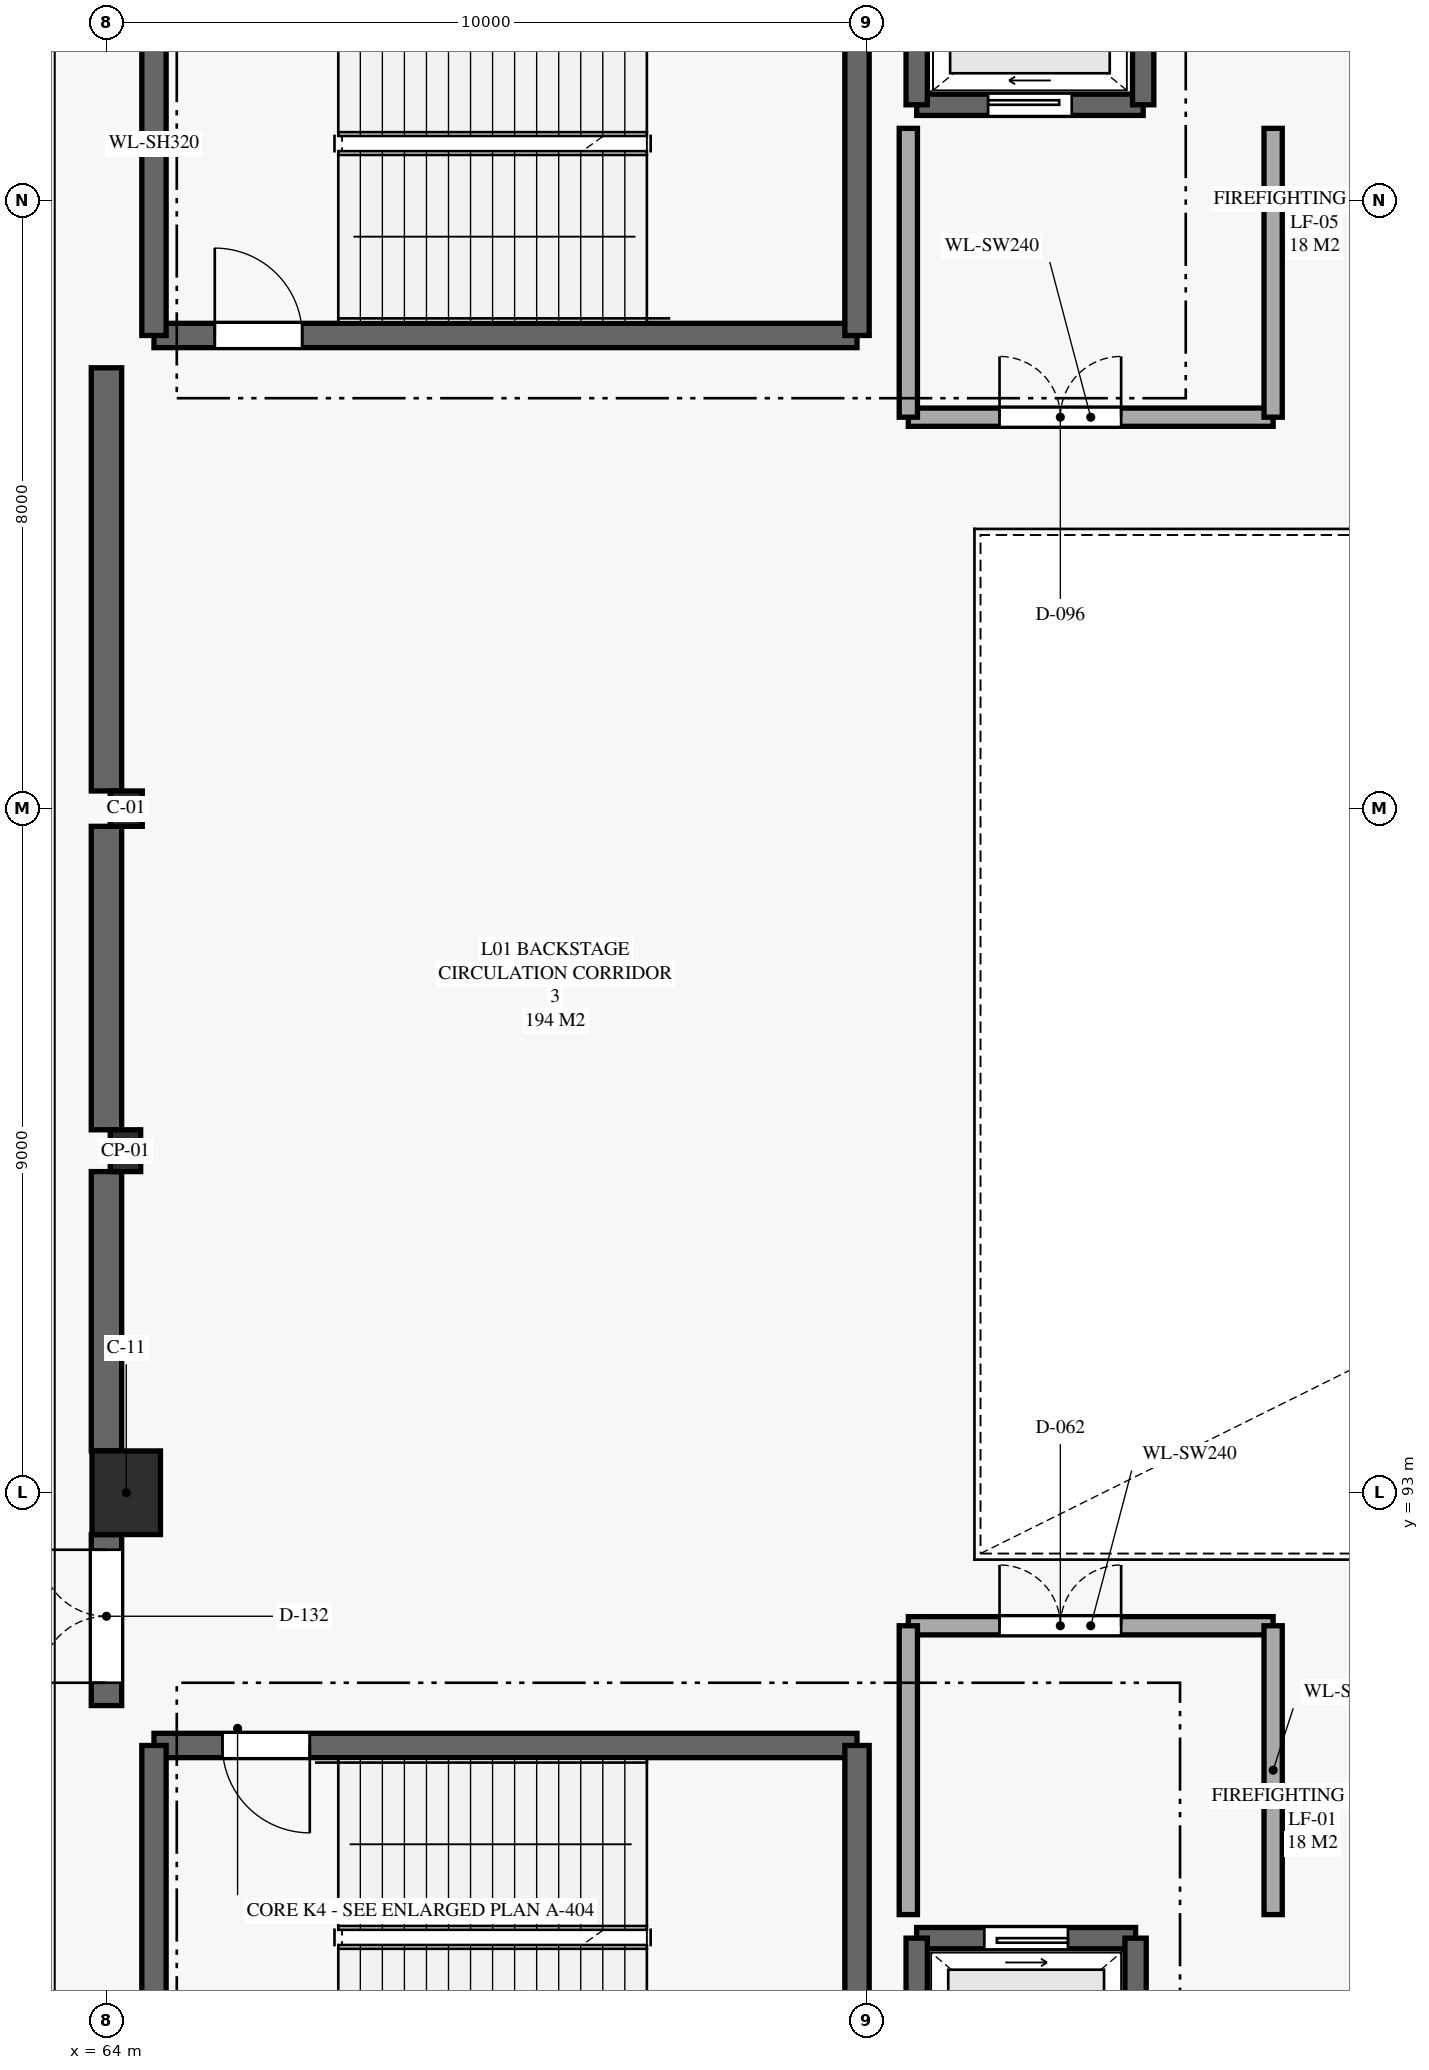
"""IFC4 building model, lengths in metres.
Left out: names, types, materials, properties, quantities, classifications, styles, units other than length and angle.
Written with IfcOpenShell. Run it as: python <this file> out.ifc"""

import sys

from ifc_helpers import new_model, si_unit, direction, frame, frame_2d, origin, origin_2d, place, context, subcontext, project, spatial, rectangle, i_section, extrude, element, fill, save


model = new_model("IFC4")
c1 = context("Model", 3, precision=1e-05, world=origin(), true_north=direction((0.0, 1.0)))
c2 = subcontext(c1, "Body", "Model", "MODEL_VIEW")
j1 = project(units=[si_unit("LENGTHUNIT", "METRE"), si_unit("PLANEANGLEUNIT", "RADIAN")], contexts=[c1])
p1 = place(None, origin())
s1 = spatial("IfcSite", under=j1, at=p1, CompositionType="ELEMENT")
p2 = place(p1, origin())
s2 = spatial("IfcBuilding", under=s1, at=p2, CompositionType="ELEMENT")
p3 = place(p2, frame((0.0, 0.0, 5.0)))
s3 = spatial("IfcBuildingStorey", under=s2, at=p3, CompositionType="ELEMENT", Elevation=5.0)
p4 = place(p3, frame((64.25, 97.5, 0.0), z_axis=(0.0, 0.0, 1.0), x_axis=(1.0, 0.0, 0.0)))
e1 = element("IfcColumn", 1, at=p4, inside=s3, PredefinedType="PILASTER", context=c2, shape_type="SweptSolid", body=[
    extrude(rectangle(XDim=0.4, YDim=0.55, at=origin_2d()), origin(), (0.0, 0.0, 1.0), 4.675),
])
p5 = place(p3, frame((64.26, 93.0, 0.0), z_axis=(0.0, 0.0, 1.0), x_axis=(1.0, 0.0, 0.0)))
e2 = element("IfcColumn", 2, at=p5, inside=s3, PredefinedType="COLUMN", context=c2, shape_type="SweptSolid", body=[
    extrude(rectangle(XDim=0.9, YDim=1.1, at=origin_2d()), origin(), (0.0, 0.0, 1.0), 5.0),
])
p6 = place(p3, frame((64.26, 102.0, 0.0), z_axis=(0.0, 0.0, 1.0), x_axis=(1.0, 0.0, 0.0)))
e3 = element("IfcColumn", 3, at=p6, inside=s3, PredefinedType="COLUMN", context=c2, shape_type="SweptSolid", body=[
    extrude(i_section(OverallWidth=0.422, OverallDepth=0.465, WebThickness=0.045, FlangeThickness=0.073, FilletRadius=0.02, at=origin_2d()), origin(), (0.0, 0.0, 1.0), 5.0),
])
p7 = place(p3, frame((64.625, 108.225, 0.0), z_axis=(0.0, 0.0, 1.0), x_axis=(1.0, 0.0, 0.0)))
e4 = element("IfcWall", 4, at=p7, inside=s3, PredefinedType="SHEAR", context=c2, shape_type="SweptSolid", body=[
    extrude(rectangle(XDim=9.25, YDim=0.32, at=frame_2d((4.625, 0.0))), origin(), (0.0, 0.0, 1.0), 4.675),
])
p8 = place(p7, frame((0.8, 0.0, 0.0)))
e5 = element("IfcOpeningElement", 5, at=p8, cuts=e4, PredefinedType="OPENING", context=c2, shape_type="SweptSolid", body=[
    extrude(rectangle(XDim=1.15, YDim=2.2, at=frame_2d((0.575, 1.1))), frame((0.0, 0.17, 0.0), z_axis=(0.0, -1.0, 0.0), x_axis=(1.0, 0.0, 0.0)), (0.0, 0.0, 1.0), 0.34),
])
for number, where, z_axis, x_axis in (
    (6, (64.625, 113.275, 0.0), (0.0, 0.0, 1.0), (0.0, -1.0, 0.0)),
    (7, (73.875, 108.225, 0.0), (0.0, 0.0, 1.0), (0.0, 1.0, 0.0)),
):
    element("IfcWall", number, at=place(p3, frame(where, z_axis=z_axis, x_axis=x_axis)), inside=s3, PredefinedType="SHEAR", context=c2, shape_type="SweptSolid", body=[
        extrude(rectangle(XDim=5.05, YDim=0.32, at=frame_2d((2.525, 0.0))), origin(), (0.0, 0.0, 1.0), 4.675),
    ])
p9 = place(p3, frame((73.875, 89.675, 0.0), z_axis=(0.0, 0.0, 1.0), x_axis=(-1.0, 0.0, 0.0)))
e8 = element("IfcWall", 8, at=p9, inside=s3, PredefinedType="SHEAR", context=c2, shape_type="SweptSolid", body=[
    extrude(rectangle(XDim=9.25, YDim=0.32, at=frame_2d((4.625, 0.0))), origin(), (0.0, 0.0, 1.0), 4.675),
])
p10 = place(p9, frame((7.2, 0.0, 0.0)))
e9 = element("IfcOpeningElement", 9, at=p10, cuts=e8, PredefinedType="OPENING", context=c2, shape_type="SweptSolid", body=[
    extrude(rectangle(XDim=1.15, YDim=2.2, at=frame_2d((0.575, 1.1))), frame((0.0, 0.17, 0.0), z_axis=(0.0, -1.0, 0.0), x_axis=(1.0, 0.0, 0.0)), (0.0, 0.0, 1.0), 0.34),
])
for number, where, z_axis, x_axis in (
    (10, (64.625, 89.675, 0.0), (0.0, 0.0, 1.0), (0.0, -1.0, 0.0)),
    (11, (73.875, 84.625, 0.0), (0.0, 0.0, 1.0), (0.0, 1.0, 0.0)),
):
    element("IfcWall", number, at=place(p3, frame(where, z_axis=z_axis, x_axis=x_axis)), inside=s3, PredefinedType="SHEAR", context=c2, shape_type="SweptSolid", body=[
        extrude(rectangle(XDim=5.05, YDim=0.32, at=frame_2d((2.525, 0.0))), origin(), (0.0, 0.0, 1.0), 4.675),
    ])
p11 = place(p3, frame((77.54, 87.14, 0.0), z_axis=(0.0, 0.0, 1.0), x_axis=(-1.0, 0.0, 0.0)))
e12 = element("IfcWall", 12, at=p11, inside=s3, PredefinedType="SHEAR", context=c2, shape_type="SweptSolid", body=[
    extrude(rectangle(XDim=2.88, YDim=0.28, at=frame_2d((1.44, 0.0))), origin(), (0.0, 0.0, 1.0), 4.675),
])
p12 = place(p11, frame((0.89, 0.0, 0.0)))
e13 = element("IfcOpeningElement", 13, at=p12, cuts=e12, PredefinedType="OPENING", context=c2, shape_type="SweptSolid", body=[
    extrude(rectangle(XDim=1.1, YDim=2.2, at=frame_2d((0.55, 1.1))), frame((0.0, 0.15, 0.0), z_axis=(0.0, -1.0, 0.0), x_axis=(1.0, 0.0, 0.0)), (0.0, 0.0, 1.0), 0.3),
])
for number, where, z_axis, x_axis in (
    (14, (74.66, 87.14, 0.0), (0.0, 0.0, 1.0), (0.0, -1.0, 0.0)),
    (15, (77.54, 84.66, 0.0), (0.0, 0.0, 1.0), (0.0, 1.0, 0.0)),
):
    element("IfcWall", number, at=place(p3, frame(where, z_axis=z_axis, x_axis=x_axis)), inside=s3, PredefinedType="SHEAR", context=c2, shape_type="SweptSolid", body=[
        extrude(rectangle(XDim=2.48, YDim=0.28, at=frame_2d((1.24, 0.0))), origin(), (0.0, 0.0, 1.0), 4.675),
    ])
p13 = place(p3, frame((74.55, 91.25, 0.0), z_axis=(0.0, 0.0, 1.0), x_axis=(1.0, 0.0, 0.0)))
e16 = element("IfcWall", 16, at=p13, inside=s3, PredefinedType="SOLIDWALL", context=c2, shape_type="SweptSolid", body=[
    extrude(rectangle(XDim=4.8, YDim=0.24, at=frame_2d((2.4, 0.0))), origin(), (0.0, 0.0, 1.0), 4.675),
])
p14 = place(p13, frame((1.2, 0.0, 0.0)))
e17 = element("IfcOpeningElement", 17, at=p14, cuts=e16, PredefinedType="OPENING", context=c2, shape_type="SweptSolid", body=[
    extrude(rectangle(XDim=1.6, YDim=2.2, at=frame_2d((0.8, 1.1))), frame((0.0, 0.13, 0.0), z_axis=(0.0, -1.0, 0.0), x_axis=(1.0, 0.0, 0.0)), (0.0, 0.0, 1.0), 0.26),
])
for number, where, z_axis, x_axis in (
    (18, (74.55, 91.25, 0.0), (0.0, 0.0, 1.0), (0.0, -1.0, 0.0)),
    (19, (79.35, 87.45, 0.0), (0.0, 0.0, 1.0), (0.0, 1.0, 0.0)),
):
    element("IfcWall", number, at=place(p3, frame(where, z_axis=z_axis, x_axis=x_axis)), inside=s3, PredefinedType="SOLIDWALL", context=c2, shape_type="SweptSolid", body=[
        extrude(rectangle(XDim=3.8, YDim=0.24, at=frame_2d((1.9, 0.0))), origin(), (0.0, 0.0, 1.0), 4.675),
    ])
p15 = place(p3, frame((74.66, 111.26, 0.0), z_axis=(0.0, 0.0, 1.0), x_axis=(1.0, 0.0, 0.0)))
e20 = element("IfcWall", 20, at=p15, inside=s3, PredefinedType="SHEAR", context=c2, shape_type="SweptSolid", body=[
    extrude(rectangle(XDim=2.98, YDim=0.28, at=frame_2d((1.49, 0.0))), origin(), (0.0, 0.0, 1.0), 4.675),
])
p16 = place(p15, frame((0.94, 0.0, 0.0)))
e21 = element("IfcOpeningElement", 21, at=p16, cuts=e20, PredefinedType="OPENING", context=c2, shape_type="SweptSolid", body=[
    extrude(rectangle(XDim=1.1, YDim=2.2, at=frame_2d((0.55, 1.1))), frame((0.0, 0.15, 0.0), z_axis=(0.0, -1.0, 0.0), x_axis=(1.0, 0.0, 0.0)), (0.0, 0.0, 1.0), 0.3),
])
for number, where, z_axis, x_axis in (
    (22, (74.66, 113.74, 0.0), (0.0, 0.0, 1.0), (0.0, -1.0, 0.0)),
    (23, (77.64, 111.26, 0.0), (0.0, 0.0, 1.0), (0.0, 1.0, 0.0)),
):
    element("IfcWall", number, at=place(p3, frame(where, z_axis=z_axis, x_axis=x_axis)), inside=s3, PredefinedType="SHEAR", context=c2, shape_type="SweptSolid", body=[
        extrude(rectangle(XDim=2.48, YDim=0.28, at=frame_2d((1.24, 0.0))), origin(), (0.0, 0.0, 1.0), 4.675),
    ])
p17 = place(p3, frame((74.55, 107.15, 0.0), z_axis=(0.0, 0.0, 1.0), x_axis=(1.0, 0.0, 0.0)))
e24 = element("IfcWall", 24, at=p17, inside=s3, PredefinedType="SOLIDWALL", context=c2, shape_type="SweptSolid", body=[
    extrude(rectangle(XDim=4.8, YDim=0.24, at=frame_2d((2.4, 0.0))), origin(), (0.0, 0.0, 1.0), 4.675),
])
p18 = place(p17, frame((1.2, 0.0, 0.0)))
e25 = element("IfcOpeningElement", 25, at=p18, cuts=e24, PredefinedType="OPENING", context=c2, shape_type="SweptSolid", body=[
    extrude(rectangle(XDim=1.6, YDim=2.2, at=frame_2d((0.8, 1.1))), frame((0.0, 0.13, 0.0), z_axis=(0.0, -1.0, 0.0), x_axis=(1.0, 0.0, 0.0)), (0.0, 0.0, 1.0), 0.26),
])
for number, where, z_axis, x_axis in (
    (26, (74.55, 110.95, 0.0), (0.0, 0.0, 1.0), (0.0, -1.0, 0.0)),
    (27, (79.35, 107.15, 0.0), (0.0, 0.0, 1.0), (0.0, 1.0, 0.0)),
):
    element("IfcWall", number, at=place(p3, frame(where, z_axis=z_axis, x_axis=x_axis)), inside=s3, PredefinedType="SOLIDWALL", context=c2, shape_type="SweptSolid", body=[
        extrude(rectangle(XDim=3.8, YDim=0.24, at=frame_2d((1.9, 0.0))), origin(), (0.0, 0.0, 1.0), 4.675),
    ])
p19 = place(p3, frame((64.0, 90.2, 0.0), z_axis=(0.0, 0.0, 1.0), x_axis=(0.0, 1.0, 0.0)))
e28 = element("IfcWall", 28, at=p19, inside=s3, PredefinedType="SHEAR", context=c2, shape_type="SweptSolid", body=[
    extrude(rectangle(XDim=2.25, YDim=0.4, at=frame_2d((1.125, 0.0))), origin(), (0.0, 0.0, 1.0), 4.675),
])
p20 = place(p19, frame((0.3, 0.0, 0.0)))
e29 = element("IfcOpeningElement", 29, at=p20, cuts=e28, PredefinedType="OPENING", context=c2, shape_type="SweptSolid", body=[
    extrude(rectangle(XDim=1.75, YDim=2.2, at=frame_2d((0.875, 1.1))), frame((0.0, 0.21, 0.0), z_axis=(0.0, -1.0, 0.0), x_axis=(1.0, 0.0, 0.0)), (0.0, 0.0, 1.0), 0.42),
])
p21 = place(p3, frame((64.0, 93.55, 0.0), z_axis=(0.0, 0.0, 1.0), x_axis=(0.0, 1.0, 0.0)))
e30 = element("IfcWall", 30, at=p21, inside=s3, PredefinedType="SHEAR", context=c2, shape_type="SweptSolid", body=[
    extrude(rectangle(XDim=3.675, YDim=0.4, at=frame_2d((1.837, 0.0))), origin(), (0.0, 0.0, 1.0), 4.675),
])
p22 = place(p3, frame((64.0, 97.775, 0.0), z_axis=(0.0, 0.0, 1.0), x_axis=(0.0, 1.0, 0.0)))
e31 = element("IfcWall", 31, at=p22, inside=s3, PredefinedType="SHEAR", context=c2, shape_type="SweptSolid", body=[
    extrude(rectangle(XDim=3.993, YDim=0.4, at=frame_2d((1.996, 0.0))), origin(), (0.0, 0.0, 1.0), 4.675),
])
p23 = place(p3, frame((64.0, 102.232, 0.0), z_axis=(0.0, 0.0, 1.0), x_axis=(0.0, 1.0, 0.0)))
e32 = element("IfcWall", 32, at=p23, inside=s3, PredefinedType="SHEAR", context=c2, shape_type="SweptSolid", body=[
    extrude(rectangle(XDim=5.568, YDim=0.4, at=frame_2d((2.784, 0.0))), origin(), (0.0, 0.0, 1.0), 4.675),
])
p24 = place(p8, origin())
e33 = element("IfcDoor", 33, at=p24, inside=s3, OperationType="SINGLE_SWING_LEFT", PredefinedType="DOOR", context=c2, shape_type="SweptSolid", body=[
    extrude(rectangle(XDim=1.15, YDim=2.2, at=frame_2d((0.575, 1.1))), frame((0.0, 0.025, 0.0), z_axis=(0.0, -1.0, 0.0), x_axis=(1.0, 0.0, 0.0)), (0.0, 0.0, 1.0), 0.05),
])
fill(e5, e33)
p25 = place(p10, origin())
e34 = element("IfcDoor", 34, at=p25, inside=s3, OperationType="SINGLE_SWING_LEFT", PredefinedType="DOOR", context=c2, shape_type="SweptSolid", body=[
    extrude(rectangle(XDim=1.15, YDim=2.2, at=frame_2d((0.575, 1.1))), frame((0.0, 0.025, 0.0), z_axis=(0.0, -1.0, 0.0), x_axis=(1.0, 0.0, 0.0)), (0.0, 0.0, 1.0), 0.05),
])
fill(e9, e34)
p26 = place(p12, origin())
e35 = element("IfcDoor", 35, at=p26, inside=s3, OperationType="SLIDING_TO_LEFT", PredefinedType="DOOR", context=c2, shape_type="SweptSolid", body=[
    extrude(rectangle(XDim=1.1, YDim=2.2, at=frame_2d((0.55, 1.1))), frame((0.0, 0.025, 0.0), z_axis=(0.0, -1.0, 0.0), x_axis=(1.0, 0.0, 0.0)), (0.0, 0.0, 1.0), 0.05),
])
fill(e13, e35)
p27 = place(p14, origin())
e36 = element("IfcDoor", 36, at=p27, inside=s3, OperationType="DOUBLE_DOOR_SINGLE_SWING", PredefinedType="DOOR", context=c2, shape_type="SweptSolid", body=[
    extrude(rectangle(XDim=1.6, YDim=2.2, at=frame_2d((0.8, 1.1))), frame((0.0, 0.025, 0.0), z_axis=(0.0, -1.0, 0.0), x_axis=(1.0, 0.0, 0.0)), (0.0, 0.0, 1.0), 0.05),
])
fill(e17, e36)
p28 = place(p16, origin())
e37 = element("IfcDoor", 37, at=p28, inside=s3, OperationType="SLIDING_TO_LEFT", PredefinedType="DOOR", context=c2, shape_type="SweptSolid", body=[
    extrude(rectangle(XDim=1.1, YDim=2.2, at=frame_2d((0.55, 1.1))), frame((0.0, 0.025, 0.0), z_axis=(0.0, -1.0, 0.0), x_axis=(1.0, 0.0, 0.0)), (0.0, 0.0, 1.0), 0.05),
])
fill(e21, e37)
p29 = place(p18, origin())
e38 = element("IfcDoor", 38, at=p29, inside=s3, OperationType="DOUBLE_DOOR_SINGLE_SWING", PredefinedType="DOOR", context=c2, shape_type="SweptSolid", body=[
    extrude(rectangle(XDim=1.6, YDim=2.2, at=frame_2d((0.8, 1.1))), frame((0.0, 0.025, 0.0), z_axis=(0.0, -1.0, 0.0), x_axis=(1.0, 0.0, 0.0)), (0.0, 0.0, 1.0), 0.05),
])
fill(e25, e38)
p30 = place(p20, origin())
e39 = element("IfcDoor", 39, at=p30, inside=s3, OperationType="DOUBLE_DOOR_SINGLE_SWING", PredefinedType="DOOR", context=c2, shape_type="SweptSolid", body=[
    extrude(rectangle(XDim=1.75, YDim=2.2, at=frame_2d((0.875, 1.1))), frame((0.0, 0.025, 0.0), z_axis=(0.0, -1.0, 0.0), x_axis=(1.0, 0.0, 0.0)), (0.0, 0.0, 1.0), 0.05),
])
fill(e29, e39)
save(model, sys.argv[1])
